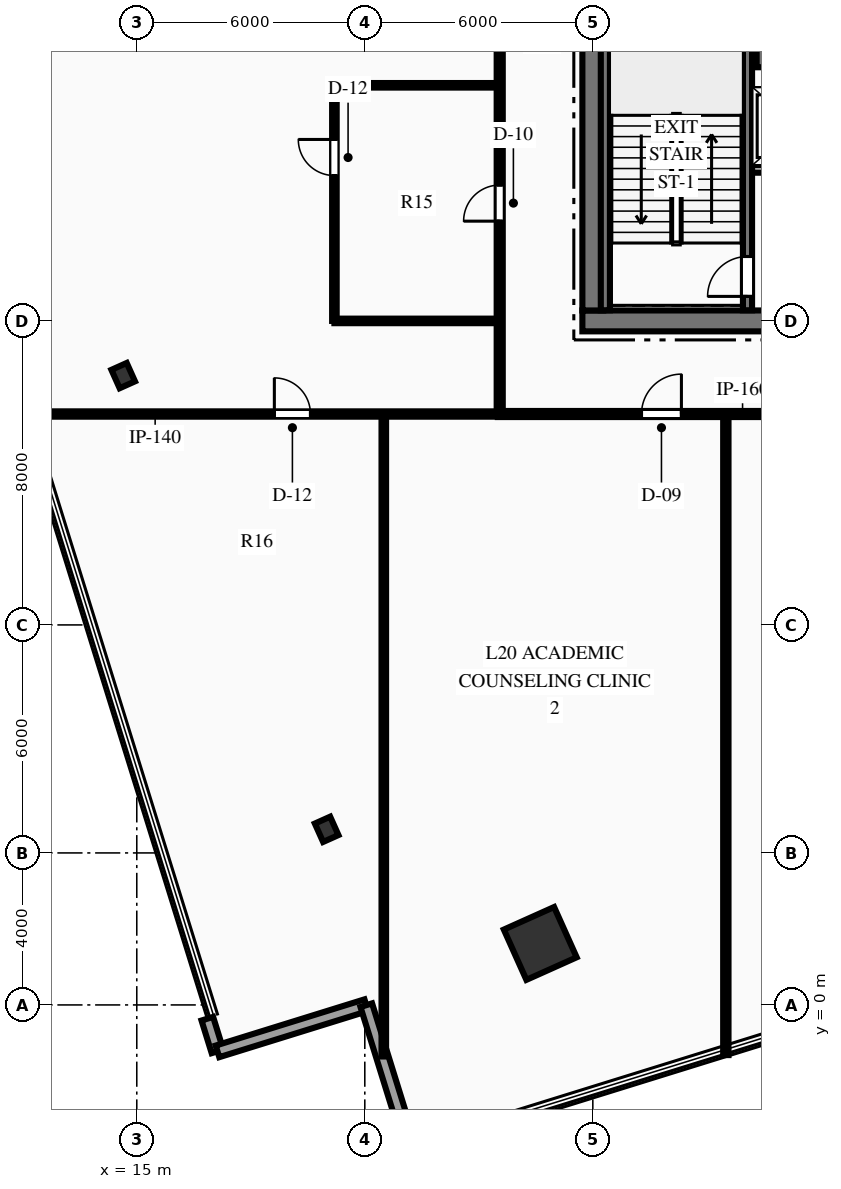
"""IFC4 building model, lengths in metres.
Left out: names, types, materials, properties, quantities, classifications, styles, units other than length and angle.
Written with IfcOpenShell. Run it as: python <this file> out.ifc"""

import sys

from ifc_helpers import new_model, si_unit, direction, frame, frame_2d, origin, origin_2d, place, context, subcontext, project, spatial, rectangle, hollow_rectangle, i_section, extrude, element, fill, save


model = new_model("IFC4")
c1 = context("Model", 3, precision=1e-05, world=origin(), true_north=direction((0.0, 1.0)))
c2 = subcontext(c1, "Body", "Model", "MODEL_VIEW")
j1 = project(units=[si_unit("LENGTHUNIT", "METRE"), si_unit("PLANEANGLEUNIT", "RADIAN")], contexts=[c1])
p1 = place(None, origin())
s1 = spatial("IfcSite", under=j1, at=p1, CompositionType="ELEMENT")
p2 = place(p1, origin())
s2 = spatial("IfcBuilding", under=s1, at=p2, CompositionType="ELEMENT")
p3 = place(p2, frame((0.0, 0.0, 85.95)))
s3 = spatial("IfcBuildingStorey", under=s2, at=p3, CompositionType="ELEMENT", Elevation=85.95)
p4 = place(p3, frame((26.725, 18.0, 0.0), z_axis=(0.0, 0.0, 1.0), x_axis=(1.0, 0.0, 0.0)))
e1 = element("IfcWall", 1, at=p4, inside=s3, PredefinedType="SHEAR", context=c2, shape_type="SweptSolid", body=[
    extrude(rectangle(XDim=18.55, YDim=0.55, at=frame_2d((9.275, 0.0))), origin(), (0.0, 0.0, 1.0), 4.5),
])
p5 = place(p4, frame((7.375, 0.0, 0.0)))
e2 = element("IfcOpeningElement", 2, at=p5, cuts=e1, PredefinedType="OPENING", context=c2, shape_type="SweptSolid", body=[
    extrude(rectangle(XDim=1.1, YDim=2.15, at=frame_2d((0.55, 1.075))), frame((0.0, 0.285, 0.0), z_axis=(0.0, -1.0, 0.0), x_axis=(1.0, 0.0, 0.0)), (0.0, 0.0, 1.0), 0.57),
])
p6 = place(p4, frame((10.075, 0.0, 0.0)))
e3 = element("IfcOpeningElement", 3, at=p6, cuts=e1, PredefinedType="OPENING", context=c2, shape_type="SweptSolid", body=[
    extrude(rectangle(XDim=1.1, YDim=2.15, at=frame_2d((0.55, 1.075))), frame((0.0, 0.285, 0.0), z_axis=(0.0, -1.0, 0.0), x_axis=(1.0, 0.0, 0.0)), (0.0, 0.0, 1.0), 0.57),
])
p7 = place(p3, frame((27.0, 18.275, 0.0), z_axis=(0.0, 0.0, 1.0), x_axis=(0.0, 1.0, 0.0)))
e4 = element("IfcWall", 4, at=p7, inside=s3, PredefinedType="SHEAR", context=c2, shape_type="SweptSolid", body=[
    extrude(rectangle(XDim=15.45, YDim=0.55, at=frame_2d((7.725, 0.0))), origin(), (0.0, 0.0, 1.0), 4.5),
])
p8 = place(p7, frame((9.965, 0.0, 0.0)))
e5 = element("IfcOpeningElement", 5, at=p8, cuts=e4, PredefinedType="OPENING", context=c2, shape_type="SweptSolid", body=[
    extrude(rectangle(XDim=1.4, YDim=2.2, at=frame_2d((0.7, 1.1))), frame((0.0, 0.285, 0.0), z_axis=(0.0, -1.0, 0.0), x_axis=(1.0, 0.0, 0.0)), (0.0, 0.0, 1.0), 0.57),
])
p9 = place(p3, frame((31.31, 24.95, 0.0), z_axis=(0.0, 0.0, 1.0), x_axis=(1.0, 0.0, 0.0)))
e6 = element("IfcWall", 6, at=p9, inside=s3, PredefinedType="SHEAR", context=c2, shape_type="SweptSolid", body=[
    extrude(rectangle(XDim=9.38, YDim=0.55, at=frame_2d((4.69, 0.0))), origin(), (0.0, 0.0, 1.0), 4.5),
])
p10 = place(p3, frame((31.07, 18.28, 0.0), z_axis=(0.0, 0.0, 1.0), x_axis=(0.0, 1.0, 0.0)))
e7 = element("IfcWall", 7, at=p10, inside=s3, PredefinedType="SHEAR", context=c2, shape_type="SweptSolid", body=[
    extrude(rectangle(XDim=8.26, YDim=0.24, at=frame_2d((4.13, 0.0))), origin(), (0.0, 0.0, 1.0), 4.5),
])
p11 = place(p10, frame((0.365, 0.0, 0.0)))
e8 = element("IfcOpeningElement", 8, at=p11, cuts=e7, PredefinedType="OPENING", context=c2, shape_type="SweptSolid", body=[
    extrude(rectangle(XDim=1.05, YDim=2.15, at=frame_2d((0.525, 1.075))), frame((0.0, 0.13, 0.0), z_axis=(0.0, -1.0, 0.0), x_axis=(1.0, 0.0, 0.0)), (0.0, 0.0, 1.0), 0.26),
])
p12 = place(p3, frame((27.33, 18.28, 0.0), z_axis=(0.0, 0.0, 1.0), x_axis=(0.0, 1.0, 0.0)))
e9 = element("IfcWall", 9, at=p12, inside=s3, PredefinedType="SHEAR", context=c2, shape_type="SweptSolid", body=[
    extrude(rectangle(XDim=8.26, YDim=0.24, at=frame_2d((4.13, 0.0))), origin(), (0.0, 0.0, 1.0), 4.5),
])
p13 = place(p3, frame((25.617, 1.618, 0.0), z_axis=(0.0, 0.0, 1.0), x_axis=(0.912477494148, 0.409126902895, 0.0)))
e10 = element("IfcColumn", 10, at=p13, inside=s3, PredefinedType="COLUMN", context=c2, shape_type="SweptSolid", body=[
    extrude(hollow_rectangle(XDim=1.45, YDim=1.45, WallThickness=0.07, at=origin_2d()), origin(), (0.0, 0.0, 1.0), 4.5),
])
for number, where, z_axis, x_axis in (
    (11, (14.643, 16.561, 0.0), (0.0, 0.0, 1.0), (0.912, 0.409, 0.0)),
    (12, (19.996, 4.621, 0.0), (0.0, 0.0, 1.0), (0.912, 0.409, 0.0)),
):
    element("IfcColumn", number, at=place(p3, frame(where, z_axis=z_axis, x_axis=x_axis)), inside=s3, PredefinedType="COLUMN", context=c2, shape_type="SweptSolid", body=[
        extrude(i_section(OverallWidth=0.442, OverallDepth=0.531, WebThickness=0.066, FlangeThickness=0.106, at=origin_2d()), origin(), (0.0, 0.0, 1.0), 4.5),
    ])
p14 = place(p3, frame((17.123, -1.222, 0.0), z_axis=(0.0, 0.0, 1.0), x_axis=(-0.296467465889, 0.955042952788, 0.0)))
e13 = element("IfcWall", 13, at=p14, inside=s3, PredefinedType="STANDARD", context=c2, shape_type="SweptSolid", body=[
    extrude(rectangle(XDim=0.9, YDim=0.32, at=frame_2d((0.45, 0.0))), origin(), (0.0, 0.0, 1.0), 4.2),
])
p15 = place(p3, frame((21.039, -0.006, 0.0), z_axis=(0.0, 0.0, 1.0), x_axis=(-0.955024023145, -0.296528439134, 0.0)))
e14 = element("IfcWall", 14, at=p15, inside=s3, PredefinedType="STANDARD", context=c2, shape_type="SweptSolid", body=[
    extrude(rectangle(XDim=4.1, YDim=0.32, at=frame_2d((2.05, 0.0))), origin(), (0.0, 0.0, 1.0), 4.2),
])
p16 = place(p3, frame((22.255, -3.922, 0.0), z_axis=(0.0, 0.0, 1.0), x_axis=(-0.296545302379, 0.95501878706, 0.0)))
e15 = element("IfcWall", 15, at=p16, inside=s3, PredefinedType="STANDARD", context=c2, shape_type="SweptSolid", body=[
    extrude(rectangle(XDim=4.1, YDim=0.32, at=frame_2d((2.05, 0.0))), origin(), (0.0, 0.0, 1.0), 4.2),
])
p17 = place(p3, frame((31.19, 22.0, 0.0), z_axis=(0.0, 0.0, 1.0), x_axis=(1.0, 0.0, 0.0)))
e16 = element("IfcWall", 16, at=p17, inside=s3, PredefinedType="PARTITIONING", context=c2, shape_type="SweptSolid", body=[
    extrude(rectangle(XDim=4.69, YDim=0.2, at=frame_2d((2.345, 0.0))), origin(), (0.0, 0.0, 1.0), 4.2),
])
p18 = place(p17, frame((2.91, 0.0, 0.0)))
e17 = element("IfcOpeningElement", 17, at=p18, cuts=e16, PredefinedType="OPENING", context=c2, shape_type="SweptSolid", body=[
    extrude(rectangle(XDim=0.9, YDim=2.15, at=frame_2d((0.45, 1.075))), frame((0.0, 0.11, 0.0), z_axis=(0.0, -1.0, 0.0), x_axis=(1.0, 0.0, 0.0)), (0.0, 0.0, 1.0), 0.22),
])
p19 = place(p17, frame((0.635, 0.0, 0.0)))
e18 = element("IfcOpeningElement", 18, at=p19, cuts=e16, PredefinedType="OPENING", context=c2, shape_type="SweptSolid", body=[
    extrude(rectangle(XDim=1.1, YDim=2.15, at=frame_2d((0.55, 1.075))), frame((0.0, 0.11, 0.0), z_axis=(0.0, -1.0, 0.0), x_axis=(1.0, 0.0, 0.0)), (0.0, 0.0, 1.0), 0.22),
])
p20 = place(p3, frame((24.5, 15.55, 0.0), z_axis=(0.0, 0.0, 1.0), x_axis=(1.0, 0.0, 0.0)))
e19 = element("IfcWall", 19, at=p20, inside=s3, PredefinedType="PARTITIONING", context=c2, shape_type="SweptSolid", body=[
    extrude(rectangle(XDim=23.0, YDim=0.16, at=frame_2d((11.5, 0.0))), origin(), (0.0, 0.0, 1.0), 4.2),
])
p21 = place(p20, frame((16.15, 0.0, 0.0)))
e20 = element("IfcOpeningElement", 20, at=p21, cuts=e19, PredefinedType="OPENING", context=c2, shape_type="SweptSolid", body=[
    extrude(rectangle(XDim=0.9, YDim=2.15, at=frame_2d((0.45, 1.075))), frame((0.0, 0.09, 0.0), z_axis=(0.0, -1.0, 0.0), x_axis=(1.0, 0.0, 0.0)), (0.0, 0.0, 1.0), 0.18),
])
p22 = place(p20, frame((18.45, 0.0, 0.0)))
e21 = element("IfcOpeningElement", 21, at=p22, cuts=e19, PredefinedType="OPENING", context=c2, shape_type="SweptSolid", body=[
    extrude(rectangle(XDim=0.9, YDim=2.15, at=frame_2d((0.45, 1.075))), frame((0.0, 0.09, 0.0), z_axis=(0.0, -1.0, 0.0), x_axis=(1.0, 0.0, 0.0)), (0.0, 0.0, 1.0), 0.18),
])
p23 = place(p20, frame((20.7, 0.0, 0.0)))
e22 = element("IfcOpeningElement", 22, at=p23, cuts=e19, PredefinedType="OPENING", context=c2, shape_type="SweptSolid", body=[
    extrude(rectangle(XDim=1.0, YDim=2.15, at=frame_2d((0.5, 1.075))), frame((0.0, 0.09, 0.0), z_axis=(0.0, -1.0, 0.0), x_axis=(1.0, 0.0, 0.0)), (0.0, 0.0, 1.0), 0.18),
])
p24 = place(p20, frame((3.781, 0.0, 0.0)))
e23 = element("IfcOpeningElement", 23, at=p24, cuts=e19, PredefinedType="OPENING", context=c2, shape_type="SweptSolid", body=[
    extrude(rectangle(XDim=1.05, YDim=2.15, at=frame_2d((0.525, 1.075))), frame((0.0, 0.09, 0.0), z_axis=(0.0, -1.0, 0.0), x_axis=(1.0, 0.0, 0.0)), (0.0, 0.0, 1.0), 0.18),
])
p25 = place(p20, frame((8.373, 0.0, 0.0)))
e24 = element("IfcOpeningElement", 24, at=p25, cuts=e19, PredefinedType="OPENING", context=c2, shape_type="SweptSolid", body=[
    extrude(rectangle(XDim=1.05, YDim=2.15, at=frame_2d((0.525, 1.075))), frame((0.0, 0.09, 0.0), z_axis=(0.0, -1.0, 0.0), x_axis=(1.0, 0.0, 0.0)), (0.0, 0.0, 1.0), 0.18),
])
p26 = place(p3, frame((24.55, 15.55, 0.0), z_axis=(0.0, 0.0, 1.0), x_axis=(0.0, 1.0, 0.0)))
e25 = element("IfcWall", 25, at=p26, inside=s3, PredefinedType="PARTITIONING", context=c2, shape_type="SweptSolid", body=[
    extrude(rectangle(XDim=20.9, YDim=0.16, at=frame_2d((10.45, 0.0))), origin(), (0.0, 0.0, 1.0), 4.2),
])
p27 = place(p26, frame((5.075, 0.0, 0.0)))
e26 = element("IfcOpeningElement", 26, at=p27, cuts=e25, PredefinedType="OPENING", context=c2, shape_type="SweptSolid", body=[
    extrude(rectangle(XDim=0.95, YDim=2.15, at=frame_2d((0.475, 1.075))), frame((0.0, 0.09, 0.0), z_axis=(0.0, -1.0, 0.0), x_axis=(1.0, 0.0, 0.0)), (0.0, 0.0, 1.0), 0.18),
])
p28 = place(p26, frame((12.524, 0.0, 0.0)))
e27 = element("IfcOpeningElement", 27, at=p28, cuts=e25, PredefinedType="OPENING", context=c2, shape_type="SweptSolid", body=[
    extrude(rectangle(XDim=1.05, YDim=2.15, at=frame_2d((0.525, 1.075))), frame((0.0, 0.09, 0.0), z_axis=(0.0, -1.0, 0.0), x_axis=(1.0, 0.0, 0.0)), (0.0, 0.0, 1.0), 0.18),
])
p29 = place(p3, frame((11.958, 15.55, 0.0), z_axis=(0.0, 0.0, 1.0), x_axis=(1.0, 0.0, 0.0)))
e28 = element("IfcWall", 28, at=p29, inside=s3, PredefinedType="PARTITIONING", context=c2, shape_type="SweptSolid", body=[
    extrude(rectangle(XDim=12.593, YDim=0.14, at=frame_2d((6.296, 0.0))), origin(), (0.0, 0.0, 1.0), 4.2),
])
p30 = place(p29, frame((6.663, 0.0, 0.0)))
e29 = element("IfcOpeningElement", 29, at=p30, cuts=e28, PredefinedType="OPENING", context=c2, shape_type="SweptSolid", body=[
    extrude(rectangle(XDim=0.95, YDim=2.15, at=frame_2d((0.475, 1.075))), frame((0.0, 0.08, 0.0), z_axis=(0.0, -1.0, 0.0), x_axis=(1.0, 0.0, 0.0)), (0.0, 0.0, 1.0), 0.16),
])
p31 = place(p3, frame((21.5, -1.356, 0.0), z_axis=(0.0, 0.0, 1.0), x_axis=(0.0, 1.0, 0.0)))
e30 = element("IfcWall", 30, at=p31, inside=s3, PredefinedType="PARTITIONING", context=c2, shape_type="SweptSolid", body=[
    extrude(rectangle(XDim=16.906, YDim=0.12, at=frame_2d((8.453, 0.0))), origin(), (0.0, 0.0, 1.0), 4.2),
])
p32 = place(p3, frame((30.5, -1.32, 0.0), z_axis=(0.0, 0.0, 1.0), x_axis=(0.0, 1.0, 0.0)))
e31 = element("IfcWall", 31, at=p32, inside=s3, PredefinedType="PARTITIONING", context=c2, shape_type="SweptSolid", body=[
    extrude(rectangle(XDim=16.87, YDim=0.14, at=frame_2d((8.435, 0.0))), origin(), (0.0, 0.0, 1.0), 4.2),
])
p33 = place(p3, frame((20.2, 18.0, 0.0), z_axis=(0.0, 0.0, 1.0), x_axis=(1.0, 0.0, 0.0)))
e32 = element("IfcWall", 32, at=p33, inside=s3, PredefinedType="PARTITIONING", context=c2, shape_type="SweptSolid", body=[
    extrude(rectangle(XDim=4.35, YDim=0.12, at=frame_2d((2.175, 0.0))), origin(), (0.0, 0.0, 1.0), 3.499),
])
p34 = place(p3, frame((20.2, 18.0, 0.0), z_axis=(0.0, 0.0, 1.0), x_axis=(0.0, 1.0, 0.0)))
e33 = element("IfcWall", 33, at=p34, inside=s3, PredefinedType="PARTITIONING", context=c2, shape_type="SweptSolid", body=[
    extrude(rectangle(XDim=6.2, YDim=0.12, at=frame_2d((3.1, 0.0))), origin(), (0.0, 0.0, 1.0), 4.2),
])
p35 = place(p34, frame((3.825, 0.0, 0.0)))
e34 = element("IfcOpeningElement", 34, at=p35, cuts=e33, PredefinedType="OPENING", context=c2, shape_type="SweptSolid", body=[
    extrude(rectangle(XDim=0.95, YDim=2.15, at=frame_2d((0.475, 1.075))), frame((0.0, 0.07, 0.0), z_axis=(0.0, -1.0, 0.0), x_axis=(1.0, 0.0, 0.0)), (0.0, 0.0, 1.0), 0.14),
])
p36 = place(p3, frame((20.2, 24.2, 0.0), z_axis=(0.0, 0.0, 1.0), x_axis=(1.0, 0.0, 0.0)))
e35 = element("IfcWall", 35, at=p36, inside=s3, PredefinedType="PARTITIONING", context=c2, shape_type="SweptSolid", body=[
    extrude(rectangle(XDim=4.35, YDim=0.12, at=frame_2d((2.175, 0.0))), origin(), (0.0, 0.0, 1.0), 4.2),
])
p37 = place(p11, origin())
e36 = element("IfcDoor", 36, at=p37, inside=s3, OperationType="SINGLE_SWING_LEFT", PredefinedType="DOOR", context=c2, shape_type="SweptSolid", body=[
    extrude(rectangle(XDim=1.05, YDim=2.15, at=frame_2d((0.525, 1.075))), frame((0.0, 0.025, 0.0), z_axis=(0.0, -1.0, 0.0), x_axis=(1.0, 0.0, 0.0)), (0.0, 0.0, 1.0), 0.05),
])
fill(e8, e36)
p38 = place(p27, origin())
e37 = element("IfcDoor", 37, at=p38, inside=s3, OperationType="SINGLE_SWING_LEFT", PredefinedType="DOOR", context=c2, shape_type="SweptSolid", body=[
    extrude(rectangle(XDim=0.95, YDim=2.15, at=frame_2d((0.475, 1.075))), frame((0.0, 0.025, 0.0), z_axis=(0.0, -1.0, 0.0), x_axis=(1.0, 0.0, 0.0)), (0.0, 0.0, 1.0), 0.05),
])
fill(e26, e37)
p39 = place(p35, origin())
e38 = element("IfcDoor", 38, at=p39, inside=s3, OperationType="SINGLE_SWING_RIGHT", PredefinedType="DOOR", context=c2, shape_type="SweptSolid", body=[
    extrude(rectangle(XDim=0.95, YDim=2.15, at=frame_2d((0.475, 1.075))), frame((0.0, 0.025, 0.0), z_axis=(0.0, -1.0, 0.0), x_axis=(1.0, 0.0, 0.0)), (0.0, 0.0, 1.0), 0.05),
])
fill(e34, e38)
p40 = place(p30, origin())
e39 = element("IfcDoor", 39, at=p40, inside=s3, OperationType="SINGLE_SWING_LEFT", PredefinedType="DOOR", context=c2, shape_type="SweptSolid", body=[
    extrude(rectangle(XDim=0.95, YDim=2.15, at=frame_2d((0.475, 1.075))), frame((0.0, 0.025, 0.0), z_axis=(0.0, -1.0, 0.0), x_axis=(1.0, 0.0, 0.0)), (0.0, 0.0, 1.0), 0.05),
])
fill(e29, e39)
p41 = place(p24, origin())
e40 = element("IfcDoor", 40, at=p41, inside=s3, OperationType="SINGLE_SWING_RIGHT", PredefinedType="DOOR", context=c2, shape_type="SweptSolid", body=[
    extrude(rectangle(XDim=1.05, YDim=2.15, at=frame_2d((0.525, 1.075))), frame((0.0, 0.025, 0.0), z_axis=(0.0, -1.0, 0.0), x_axis=(1.0, 0.0, 0.0)), (0.0, 0.0, 1.0), 0.05),
])
fill(e23, e40)
save(model, sys.argv[1])
